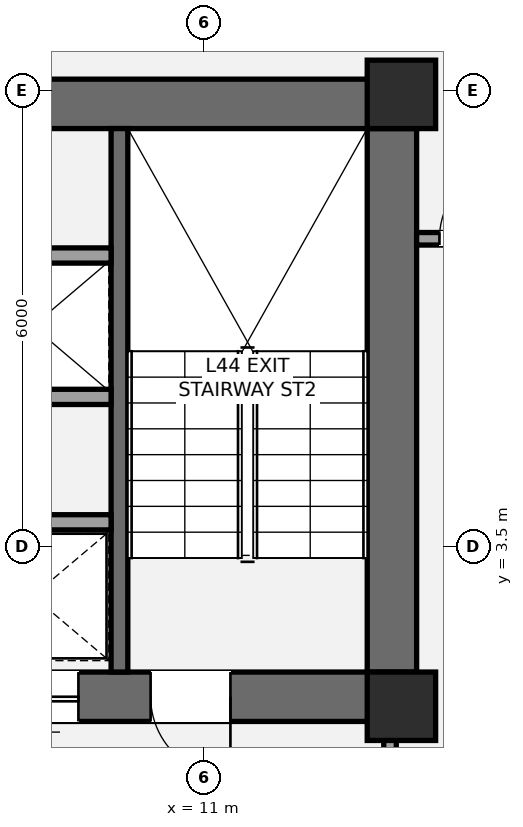
"""IFC4 building model, lengths in metres.
Left out: names, types, materials, properties, quantities, classifications, styles, units other than length and angle.
Written with IfcOpenShell. Run it as: python <this file> out.ifc"""

import sys

from ifc_helpers import new_model, si_unit, direction, frame, frame_2d, origin, origin_2d, place, context, subcontext, project, spatial, rectangle, extrude, element, fill, save


model = new_model("IFC4")
c1 = context("Model", 3, precision=1e-05, world=origin(), true_north=direction((0.0, 1.0)))
c2 = subcontext(c1, "Body", "Model", "MODEL_VIEW")
j1 = project(units=[si_unit("LENGTHUNIT", "METRE"), si_unit("PLANEANGLEUNIT", "RADIAN")], contexts=[c1])
p1 = place(None, origin())
s1 = spatial("IfcSite", under=j1, at=p1, CompositionType="ELEMENT")
p2 = place(p1, origin())
s2 = spatial("IfcBuilding", under=s1, at=p2, CompositionType="ELEMENT")
p3 = place(p2, frame((0.0, 0.0, 163.0)))
s3 = spatial("IfcBuildingStorey", under=s2, at=p3, CompositionType="ELEMENT", Elevation=163.0)
p4 = place(p3, frame((13.475, 1.2, 0.0), z_axis=(0.0, 0.0, 1.0), x_axis=(0.0, 1.0, 0.0)))
e1 = element("IfcWall", 1, at=p4, inside=s3, PredefinedType="SHEAR", context=c2, shape_type="SweptSolid", body=[
    extrude(rectangle(XDim=8.45, YDim=0.65, at=frame_2d((4.225, 0.0))), origin(), (0.0, 0.0, 1.0), 3.2),
])
p5 = place(p3, frame((4.475, 9.325, 0.0), z_axis=(0.0, 0.0, 1.0), x_axis=(1.0, 0.0, 0.0)))
e2 = element("IfcWall", 2, at=p5, inside=s3, PredefinedType="SHEAR", context=c2, shape_type="SweptSolid", body=[
    extrude(rectangle(XDim=9.325, YDim=0.65, at=frame_2d((4.663, 0.0))), origin(), (0.0, 0.0, 1.0), 3.2),
])
p6 = place(p3, frame((13.8, 1.525, 0.0), z_axis=(0.0, 0.0, 1.0), x_axis=(-1.0, 0.0, 0.0)))
e3 = element("IfcWall", 3, at=p6, inside=s3, PredefinedType="SHEAR", context=c2, shape_type="SweptSolid", body=[
    extrude(rectangle(XDim=8.925, YDim=0.65, at=frame_2d((4.462, 0.0))), origin(), (0.0, 0.0, 1.0), 3.2),
])
p7 = place(p6, frame((2.45, 0.0, 0.0)))
e4 = element("IfcOpeningElement", 4, at=p7, cuts=e3, PredefinedType="OPENING", context=c2, shape_type="SweptSolid", body=[
    extrude(rectangle(XDim=1.05, YDim=2.15, at=frame_2d((0.525, 1.075))), frame((0.0, 0.335, 0.0), z_axis=(0.0, -1.0, 0.0), x_axis=(1.0, 0.0, 0.0)), (0.0, 0.0, 1.0), 0.67),
])
p8 = place(p6, frame((4.45, 0.0, 0.0)))
e5 = element("IfcOpeningElement", 5, at=p8, cuts=e3, PredefinedType="OPENING", context=c2, shape_type="SweptSolid", body=[
    extrude(rectangle(XDim=1.1, YDim=2.2, at=frame_2d((0.55, 1.1))), frame((0.0, 0.335, 0.0), z_axis=(0.0, -1.0, 0.0), x_axis=(1.0, 0.0, 0.0)), (0.0, 0.0, 1.0), 0.67),
])
p9 = place(p3, frame((9.89, 1.85, 0.0), z_axis=(0.0, 0.0, 1.0), x_axis=(0.0, 1.0, 0.0)))
e6 = element("IfcWall", 6, at=p9, inside=s3, PredefinedType="SHEAR", context=c2, shape_type="SweptSolid", body=[
    extrude(rectangle(XDim=7.15, YDim=0.22, at=frame_2d((3.575, 0.0))), origin(), (0.0, 0.0, 1.0), 3.2),
])
for number, where, z_axis, x_axis in (
    (7, (13.6, 1.4, 0.0), (0.0, 0.0, 1.0), (1.0, 0.0, 0.0)),
    (8, (13.6, 9.45, 0.0), (0.0, 0.0, 1.0), (1.0, 0.0, 0.0)),
):
    element("IfcColumn", number, at=place(p3, frame(where, z_axis=z_axis, x_axis=x_axis)), inside=s3, PredefinedType="COLUMN", context=c2, shape_type="SweptSolid", body=[
        extrude(rectangle(XDim=0.9, YDim=0.9, at=origin_2d()), origin(), (0.0, 0.0, 1.0), 3.2),
    ])
p10 = place(p3, frame((13.45, -2.15, 0.0), z_axis=(0.0, 0.0, 1.0), x_axis=(0.0, 1.0, 0.0)))
e9 = element("IfcWall", 9, at=p10, inside=s3, PredefinedType="PARTITIONING", context=c2, shape_type="SweptSolid", body=[
    extrude(rectangle(XDim=3.4, YDim=0.165, at=frame_2d((1.7, 0.0))), origin(), (0.0, 0.0, 1.0), 3.02),
])
p11 = place(p10, frame((1.15, 0.0, 0.0)))
e10 = element("IfcOpeningElement", 10, at=p11, cuts=e9, PredefinedType="OPENING", context=c2, shape_type="SweptSolid", body=[
    extrude(rectangle(XDim=1.05, YDim=2.15, at=frame_2d((0.525, 1.075))), frame((0.0, 0.093, 0.0), z_axis=(0.0, -1.0, 0.0), x_axis=(1.0, 0.0, 0.0)), (0.0, 0.0, 1.0), 0.185),
])
p12 = place(p3, frame((5.525, 3.82, 0.0), z_axis=(0.0, 0.0, 1.0), x_axis=(1.0, 0.0, 0.0)))
e11 = element("IfcWall", 11, at=p12, inside=s3, PredefinedType="SOLIDWALL", context=c2, shape_type="SweptSolid", body=[
    extrude(rectangle(XDim=4.255, YDim=0.2, at=frame_2d((2.127, 0.0))), origin(), (0.0, 0.0, 1.0), 3.02),
])
p13 = place(p12, frame((0.65, 0.0, 0.0)))
e12 = element("IfcOpeningElement", 12, at=p13, cuts=e11, PredefinedType="OPENING", context=c2, shape_type="SweptSolid", body=[
    extrude(rectangle(XDim=1.2, YDim=2.2, at=frame_2d((0.6, 1.1))), frame((0.0, 0.11, 0.0), z_axis=(0.0, -1.0, 0.0), x_axis=(1.0, 0.0, 0.0)), (0.0, 0.0, 1.0), 0.22),
])
for number, where, z_axis, x_axis in (
    (13, (5.525, 5.47, 0.0), (0.0, 0.0, 1.0), (1.0, 0.0, 0.0)),
    (14, (5.525, 7.33, 0.0), (0.0, 0.0, 1.0), (1.0, 0.0, 0.0)),
):
    element("IfcWall", number, at=place(p3, frame(where, z_axis=z_axis, x_axis=x_axis)), inside=s3, PredefinedType="SOLIDWALL", context=c2, shape_type="SweptSolid", body=[
        extrude(rectangle(XDim=4.255, YDim=0.2, at=frame_2d((2.127, 0.0))), origin(), (0.0, 0.0, 1.0), 3.02),
    ])
p14 = place(p3, frame((13.8, 7.55, 0.0), z_axis=(0.0, 0.0, 1.0), x_axis=(1.0, 0.0, 0.0)))
e15 = element("IfcWall", 15, at=p14, inside=s3, PredefinedType="PARTITIONING", context=c2, shape_type="SweptSolid", body=[
    extrude(rectangle(XDim=1.75, YDim=0.165, at=frame_2d((0.875, 0.0))), origin(), (0.0, 0.0, 1.0), 2.473),
])
p15 = place(p14, frame((0.3, 0.0, 0.0)))
e16 = element("IfcOpeningElement", 16, at=p15, cuts=e15, PredefinedType="OPENING", context=c2, shape_type="SweptSolid", body=[
    extrude(rectangle(XDim=1.0, YDim=2.15, at=frame_2d((0.5, 1.075))), frame((0.0, 0.093, 0.0), z_axis=(0.0, -1.0, 0.0), x_axis=(1.0, 0.0, 0.0)), (0.0, 0.0, 1.0), 0.185),
])
p16 = place(p7, origin())
e17 = element("IfcDoor", 17, at=p16, inside=s3, OperationType="SINGLE_SWING_LEFT", PredefinedType="DOOR", context=c2, shape_type="SweptSolid", body=[
    extrude(rectangle(XDim=1.05, YDim=2.15, at=frame_2d((0.525, 1.075))), frame((0.0, 0.025, 0.0), z_axis=(0.0, -1.0, 0.0), x_axis=(1.0, 0.0, 0.0)), (0.0, 0.0, 1.0), 0.05),
])
fill(e4, e17)
p17 = place(p8, origin())
e18 = element("IfcDoor", 18, at=p17, inside=s3, OperationType="SLIDING_TO_LEFT", PredefinedType="DOOR", context=c2, shape_type="SweptSolid", body=[
    extrude(rectangle(XDim=1.1, YDim=2.2, at=frame_2d((0.55, 1.1))), frame((0.0, 0.025, 0.0), z_axis=(0.0, -1.0, 0.0), x_axis=(1.0, 0.0, 0.0)), (0.0, 0.0, 1.0), 0.05),
])
fill(e5, e18)
p18 = place(p15, origin())
e19 = element("IfcDoor", 19, at=p18, inside=s3, OperationType="SINGLE_SWING_RIGHT", PredefinedType="DOOR", context=c2, shape_type="SweptSolid", body=[
    extrude(rectangle(XDim=1.0, YDim=2.15, at=frame_2d((0.5, 1.075))), frame((0.0, 0.025, 0.0), z_axis=(0.0, -1.0, 0.0), x_axis=(1.0, 0.0, 0.0)), (0.0, 0.0, 1.0), 0.05),
])
fill(e16, e19)
save(model, sys.argv[1])
